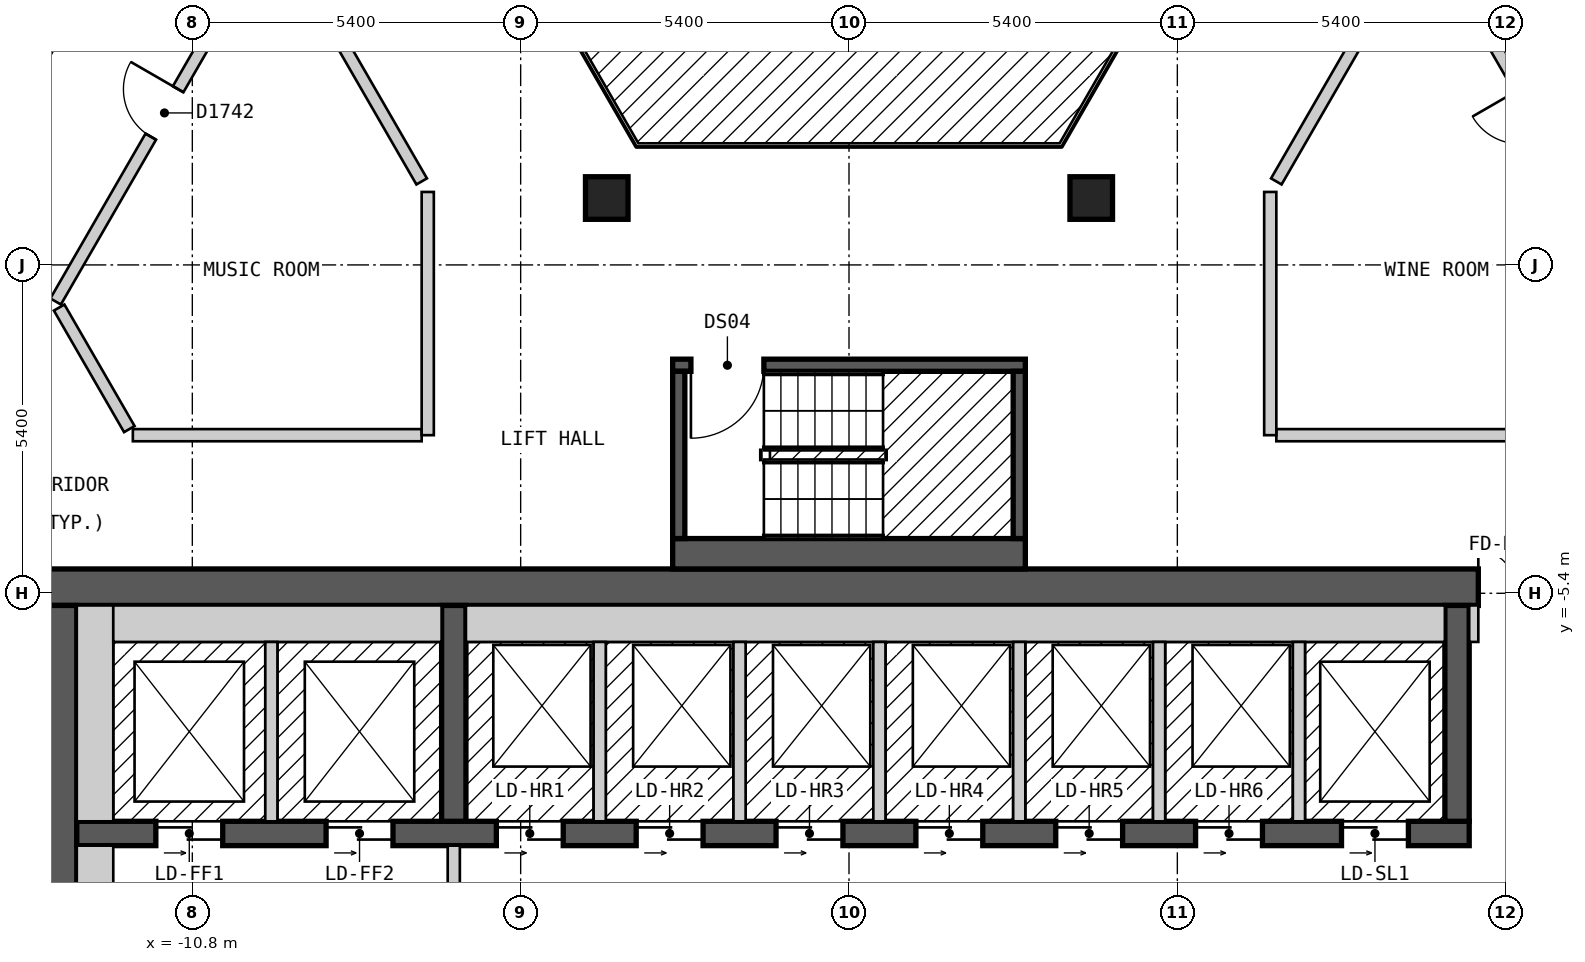
"""IFC4 building model, lengths in metres.
Left out: names, types, materials, properties, quantities, classifications, styles, units other than length and angle.
Written with IfcOpenShell. Run it as: python <this file> out.ifc"""

import sys

from ifc_helpers import new_model, si_unit, direction, frame, frame_2d, origin, origin_2d, place, context, subcontext, project, spatial, rectangle, extrude, element, fill, save


model = new_model("IFC4")
c1 = context("Model", 3, precision=1e-05, world=origin(), true_north=direction((0.0, 1.0)))
c2 = subcontext(c1, "Body", "Model", "MODEL_VIEW")
j1 = project(units=[si_unit("LENGTHUNIT", "METRE"), si_unit("PLANEANGLEUNIT", "RADIAN")], contexts=[c1])
p1 = place(None, origin())
s1 = spatial("IfcSite", under=j1, at=p1, CompositionType="ELEMENT")
p2 = place(p1, origin())
s2 = spatial("IfcBuilding", under=s1, at=p2, CompositionType="ELEMENT")
p3 = place(p2, frame((0.0, 0.0, 181.2)))
s3 = spatial("IfcBuildingStorey", under=s2, at=p3, CompositionType="ELEMENT", Elevation=181.2)
for number, where, z_axis, x_axis in (
    (1, (3.984, 1.1, 0.0), (0.0, 0.0, 1.0), (1.0, 0.0, 0.0)),
    (2, (-3.984, 1.1, 0.0), (0.0, 0.0, 1.0), (1.0, 0.0, 0.0)),
):
    element("IfcColumn", number, at=place(p3, frame(where, z_axis=z_axis, x_axis=x_axis)), inside=s3, PredefinedType="COLUMN", context=c2, shape_type="SweptSolid", body=[
        extrude(rectangle(XDim=0.7, YDim=0.7, at=origin_2d()), origin(), (0.0, 0.0, 1.0), 3.0),
    ])
p4 = place(p3, frame((-13.3, -5.3, 0.0), z_axis=(0.0, 0.0, 1.0), x_axis=(1.0, 0.0, 0.0)))
e3 = element("IfcWall", 3, at=p4, inside=s3, PredefinedType="SHEAR", context=c2, shape_type="SweptSolid", body=[
    extrude(rectangle(XDim=26.6, YDim=0.6, at=frame_2d((13.3, 0.0))), origin(), (0.0, 0.0, 1.0), 2.7),
])
p5 = place(p4, frame((23.65, 0.0, 0.0)))
e4 = element("IfcOpeningElement", 4, at=p5, cuts=e3, PredefinedType="OPENING", context=c2, shape_type="SweptSolid", body=[
    extrude(rectangle(XDim=1.2, YDim=2.1, at=frame_2d((0.6, 1.05))), frame((0.0, 0.31, 0.0), z_axis=(0.0, -1.0, 0.0), x_axis=(1.0, 0.0, 0.0)), (0.0, 0.0, 1.0), 0.62),
])
p6 = place(p3, frame((-13.0, -18.4, 0.0), z_axis=(0.0, 0.0, 1.0), x_axis=(0.0, 1.0, 0.0)))
e5 = element("IfcWall", 5, at=p6, inside=s3, PredefinedType="SHEAR", context=c2, shape_type="SweptSolid", body=[
    extrude(rectangle(XDim=12.8, YDim=0.6, at=frame_2d((6.4, 0.0))), origin(), (0.0, 0.0, 1.0), 2.7),
])
p7 = place(p6, frame((4.2, 0.0, 0.0)))
e6 = element("IfcOpeningElement", 6, at=p7, cuts=e5, PredefinedType="OPENING", context=c2, shape_type="SweptSolid", body=[
    extrude(rectangle(XDim=1.2, YDim=2.1, at=frame_2d((0.6, 1.05))), frame((0.0, 0.31, 0.0), z_axis=(0.0, -1.0, 0.0), x_axis=(1.0, 0.0, 0.0)), (0.0, 0.0, 1.0), 0.62),
])
p8 = place(p3, frame((-12.7, -9.35, 0.0), z_axis=(0.0, 0.0, 1.0), x_axis=(1.0, 0.0, 0.0)))
e7 = element("IfcWall", 7, at=p8, inside=s3, PredefinedType="SHEAR", context=c2, shape_type="SweptSolid", body=[
    extrude(rectangle(XDim=22.9, YDim=0.4, at=frame_2d((11.45, 0.0))), origin(), (0.0, 0.0, 1.0), 2.7),
])
p9 = place(p8, frame((1.3, 0.0, 0.0)))
e8 = element("IfcOpeningElement", 8, at=p9, cuts=e7, PredefinedType="OPENING", context=c2, shape_type="SweptSolid", body=[
    extrude(rectangle(XDim=1.1, YDim=2.1, at=frame_2d((0.55, 1.05))), frame((0.0, 0.21, 0.0), z_axis=(0.0, -1.0, 0.0), x_axis=(1.0, 0.0, 0.0)), (0.0, 0.0, 1.0), 0.42),
])
p10 = place(p8, frame((4.1, 0.0, 0.0)))
e9 = element("IfcOpeningElement", 9, at=p10, cuts=e7, PredefinedType="OPENING", context=c2, shape_type="SweptSolid", body=[
    extrude(rectangle(XDim=1.1, YDim=2.1, at=frame_2d((0.55, 1.05))), frame((0.0, 0.21, 0.0), z_axis=(0.0, -1.0, 0.0), x_axis=(1.0, 0.0, 0.0)), (0.0, 0.0, 1.0), 0.42),
])
p11 = place(p8, frame((6.9, 0.0, 0.0)))
e10 = element("IfcOpeningElement", 10, at=p11, cuts=e7, PredefinedType="OPENING", context=c2, shape_type="SweptSolid", body=[
    extrude(rectangle(XDim=1.1, YDim=2.1, at=frame_2d((0.55, 1.05))), frame((0.0, 0.21, 0.0), z_axis=(0.0, -1.0, 0.0), x_axis=(1.0, 0.0, 0.0)), (0.0, 0.0, 1.0), 0.42),
])
p12 = place(p8, frame((9.2, 0.0, 0.0)))
e11 = element("IfcOpeningElement", 11, at=p12, cuts=e7, PredefinedType="OPENING", context=c2, shape_type="SweptSolid", body=[
    extrude(rectangle(XDim=1.1, YDim=2.1, at=frame_2d((0.55, 1.05))), frame((0.0, 0.21, 0.0), z_axis=(0.0, -1.0, 0.0), x_axis=(1.0, 0.0, 0.0)), (0.0, 0.0, 1.0), 0.42),
])
p13 = place(p8, frame((11.5, 0.0, 0.0)))
e12 = element("IfcOpeningElement", 12, at=p13, cuts=e7, PredefinedType="OPENING", context=c2, shape_type="SweptSolid", body=[
    extrude(rectangle(XDim=1.1, YDim=2.1, at=frame_2d((0.55, 1.05))), frame((0.0, 0.21, 0.0), z_axis=(0.0, -1.0, 0.0), x_axis=(1.0, 0.0, 0.0)), (0.0, 0.0, 1.0), 0.42),
])
p14 = place(p8, frame((13.8, 0.0, 0.0)))
e13 = element("IfcOpeningElement", 13, at=p14, cuts=e7, PredefinedType="OPENING", context=c2, shape_type="SweptSolid", body=[
    extrude(rectangle(XDim=1.1, YDim=2.1, at=frame_2d((0.55, 1.05))), frame((0.0, 0.21, 0.0), z_axis=(0.0, -1.0, 0.0), x_axis=(1.0, 0.0, 0.0)), (0.0, 0.0, 1.0), 0.42),
])
p15 = place(p8, frame((16.1, 0.0, 0.0)))
e14 = element("IfcOpeningElement", 14, at=p15, cuts=e7, PredefinedType="OPENING", context=c2, shape_type="SweptSolid", body=[
    extrude(rectangle(XDim=1.1, YDim=2.1, at=frame_2d((0.55, 1.05))), frame((0.0, 0.21, 0.0), z_axis=(0.0, -1.0, 0.0), x_axis=(1.0, 0.0, 0.0)), (0.0, 0.0, 1.0), 0.42),
])
p16 = place(p8, frame((18.4, 0.0, 0.0)))
e15 = element("IfcOpeningElement", 15, at=p16, cuts=e7, PredefinedType="OPENING", context=c2, shape_type="SweptSolid", body=[
    extrude(rectangle(XDim=1.1, YDim=2.1, at=frame_2d((0.55, 1.05))), frame((0.0, 0.21, 0.0), z_axis=(0.0, -1.0, 0.0), x_axis=(1.0, 0.0, 0.0)), (0.0, 0.0, 1.0), 0.42),
])
p17 = place(p8, frame((20.8, 0.0, 0.0)))
e16 = element("IfcOpeningElement", 16, at=p17, cuts=e7, PredefinedType="OPENING", context=c2, shape_type="SweptSolid", body=[
    extrude(rectangle(XDim=1.1, YDim=2.1, at=frame_2d((0.55, 1.05))), frame((0.0, 0.21, 0.0), z_axis=(0.0, -1.0, 0.0), x_axis=(1.0, 0.0, 0.0)), (0.0, 0.0, 1.0), 0.42),
])
for number, where, z_axis, x_axis in (
    (17, (-6.5, -9.15, 0.0), (0.0, 0.0, 1.0), (0.0, 1.0, 0.0)),
    (18, (10.0, -9.15, 0.0), (0.0, 0.0, 1.0), (0.0, 1.0, 0.0)),
):
    element("IfcWall", number, at=place(p3, frame(where, z_axis=z_axis, x_axis=x_axis)), inside=s3, PredefinedType="SHEAR", context=c2, shape_type="SweptSolid", body=[
        extrude(rectangle(XDim=3.55, YDim=0.4, at=frame_2d((1.775, 0.0))), origin(), (0.0, 0.0, 1.0), 2.7),
    ])
p18 = place(p3, frame((-2.9, -4.75, 0.0), z_axis=(0.0, 0.0, 1.0), x_axis=(1.0, 0.0, 0.0)))
e19 = element("IfcWall", 19, at=p18, inside=s3, PredefinedType="SOLIDWALL", context=c2, shape_type="SweptSolid", body=[
    extrude(rectangle(XDim=5.8, YDim=0.5, at=frame_2d((2.9, 0.0))), origin(), (0.0, 0.0, 1.0), 2.7),
])
p19 = place(p3, frame((-2.9, -1.65, 0.0), z_axis=(0.0, 0.0, 1.0), x_axis=(1.0, 0.0, 0.0)))
e20 = element("IfcWall", 20, at=p19, inside=s3, PredefinedType="SOLIDWALL", context=c2, shape_type="SweptSolid", body=[
    extrude(rectangle(XDim=5.8, YDim=0.2, at=frame_2d((2.9, 0.0))), origin(), (0.0, 0.0, 1.0), 2.7),
])
p20 = place(p19, frame((0.3, 0.0, 0.0)))
e21 = element("IfcOpeningElement", 21, at=p20, cuts=e20, PredefinedType="OPENING", context=c2, shape_type="SweptSolid", body=[
    extrude(rectangle(XDim=1.2, YDim=2.1, at=frame_2d((0.6, 1.05))), frame((0.0, 0.11, 0.0), z_axis=(0.0, -1.0, 0.0), x_axis=(1.0, 0.0, 0.0)), (0.0, 0.0, 1.0), 0.22),
])
for number, where, z_axis, x_axis in (
    (22, (-2.8, -4.5, 0.0), (0.0, 0.0, 1.0), (0.0, 1.0, 0.0)),
    (23, (2.8, -4.5, 0.0), (0.0, 0.0, 1.0), (0.0, 1.0, 0.0)),
):
    element("IfcWall", number, at=place(p3, frame(where, z_axis=z_axis, x_axis=x_axis)), inside=s3, PredefinedType="SOLIDWALL", context=c2, shape_type="SweptSolid", body=[
        extrude(rectangle(XDim=2.75, YDim=0.2, at=frame_2d((1.375, 0.0))), origin(), (0.0, 0.0, 1.0), 2.7),
    ])
p21 = place(p3, frame((-9.411, 5.5, 0.0), z_axis=(0.0, 0.0, 1.0), x_axis=(0.500018099276, -0.86601495391, 0.0)))
e24 = element("IfcWall", 24, at=p21, inside=s3, PredefinedType="PARTITIONING", context=c2, shape_type="SweptSolid", body=[
    extrude(rectangle(XDim=4.765, YDim=0.2, at=frame_2d((2.383, 0.0))), origin(), (0.0, 0.0, 1.0), 2.7),
])
p22 = place(p3, frame((-12.99, -0.701, 0.0), z_axis=(0.0, 0.0, 1.0), x_axis=(0.499972710878, -0.866041158593, 0.0)))
e25 = element("IfcWall", 25, at=p22, inside=s3, PredefinedType="PARTITIONING", context=c2, shape_type="SweptSolid", body=[
    extrude(rectangle(XDim=2.308, YDim=0.2, at=frame_2d((1.154, 0.0))), origin(), (0.0, 0.0, 1.0), 2.7),
])
p23 = place(p3, frame((9.526, 5.5, 0.0), z_axis=(0.0, 0.0, 1.0), x_axis=(0.500062092869, -0.865989551482, 0.0)))
e26 = element("IfcWall", 26, at=p23, inside=s3, PredefinedType="PARTITIONING", context=c2, shape_type="SweptSolid", body=[
    extrude(rectangle(XDim=6.927, YDim=0.2, at=frame_2d((3.464, 0.0))), origin(), (0.0, 0.0, 1.0), 2.7),
])
p24 = place(p23, frame((3.014, 0.0, 0.0)))
e27 = element("IfcOpeningElement", 27, at=p24, cuts=e26, PredefinedType="OPENING", context=c2, shape_type="SweptSolid", body=[
    extrude(rectangle(XDim=0.9, YDim=2.1, at=frame_2d((0.45, 1.05))), frame((0.0, 0.11, 0.0), z_axis=(0.0, -1.0, 0.0), x_axis=(1.0, 0.0, 0.0)), (0.0, 0.0, 1.0), 0.22),
])
p25 = place(p3, frame((10.739, 7.8, 0.0), z_axis=(0.0, 0.0, 1.0), x_axis=(0.500023726918, -0.866011704609, 0.0)))
e28 = element("IfcWall", 28, at=p25, inside=s3, PredefinedType="PARTITIONING", context=c2, shape_type="SweptSolid", body=[
    extrude(rectangle(XDim=9.47, YDim=0.2, at=frame_2d((4.735, 0.0))), origin(), (0.0, 0.0, 1.0), 2.7),
])
p26 = place(p25, frame((8.168, 0.0, 0.0)))
e29 = element("IfcOpeningElement", 29, at=p26, cuts=e28, PredefinedType="OPENING", context=c2, shape_type="SweptSolid", body=[
    extrude(rectangle(XDim=1.0, YDim=2.1, at=frame_2d((0.5, 1.05))), frame((0.0, 0.11, 0.0), z_axis=(0.0, -1.0, 0.0), x_axis=(1.0, 0.0, 0.0)), (0.0, 0.0, 1.0), 0.22),
])
p27 = place(p3, frame((-11.778, -2.8, 0.0), z_axis=(0.0, 0.0, 1.0), x_axis=(1.0, 0.0, 0.0)))
e30 = element("IfcWall", 30, at=p27, inside=s3, PredefinedType="PARTITIONING", context=c2, shape_type="SweptSolid", body=[
    extrude(rectangle(XDim=4.75, YDim=0.2, at=frame_2d((2.375, 0.0))), origin(), (0.0, 0.0, 1.0), 2.7),
])
p28 = place(p3, frame((7.028, -2.8, 0.0), z_axis=(0.0, 0.0, 1.0), x_axis=(1.0, 0.0, 0.0)))
e31 = element("IfcWall", 31, at=p28, inside=s3, PredefinedType="PARTITIONING", context=c2, shape_type="SweptSolid", body=[
    extrude(rectangle(XDim=4.634, YDim=0.2, at=frame_2d((2.317, 0.0))), origin(), (0.0, 0.0, 1.0), 2.7),
])
p29 = place(p3, frame((7.028, 1.373, 0.0), z_axis=(0.0, 0.0, 1.0), x_axis=(0.500065924398, 0.86598733897, 0.0)))
e32 = element("IfcWall", 32, at=p29, inside=s3, PredefinedType="PARTITIONING", context=c2, shape_type="SweptSolid", body=[
    extrude(rectangle(XDim=4.881, YDim=0.2, at=frame_2d((2.44, 0.0))), origin(), (0.0, 0.0, 1.0), 2.7),
])
p30 = place(p3, frame((-13.048, -0.601, 0.0), z_axis=(0.0, 0.0, 1.0), x_axis=(0.499982180423, 0.866035691677, 0.0)))
e33 = element("IfcWall", 33, at=p30, inside=s3, PredefinedType="PARTITIONING", context=c2, shape_type="SweptSolid", body=[
    extrude(rectangle(XDim=7.16, YDim=0.2, at=frame_2d((3.58, 0.0))), origin(), (0.0, 0.0, 1.0), 2.7),
])
p31 = place(p30, frame((3.13, 0.0, 0.0)))
e34 = element("IfcOpeningElement", 34, at=p31, cuts=e33, PredefinedType="OPENING", context=c2, shape_type="SweptSolid", body=[
    extrude(rectangle(XDim=0.9, YDim=2.1, at=frame_2d((0.45, 1.05))), frame((0.0, 0.11, 0.0), z_axis=(0.0, -1.0, 0.0), x_axis=(1.0, 0.0, 0.0)), (0.0, 0.0, 1.0), 0.22),
])
p32 = place(p3, frame((-15.53, -0.501, 0.0), z_axis=(0.0, 0.0, 1.0), x_axis=(0.499952498232, 0.866052827206, 0.0)))
e35 = element("IfcWall", 35, at=p32, inside=s3, PredefinedType="PARTITIONING", context=c2, shape_type="SweptSolid", body=[
    extrude(rectangle(XDim=9.585, YDim=0.2, at=frame_2d((4.792, 0.0))), origin(), (0.0, 0.0, 1.0), 2.7),
])
p33 = place(p32, frame((0.525, 0.0, 0.0)))
e36 = element("IfcOpeningElement", 36, at=p33, cuts=e35, PredefinedType="OPENING", context=c2, shape_type="SweptSolid", body=[
    extrude(rectangle(XDim=1.0, YDim=2.1, at=frame_2d((0.5, 1.05))), frame((0.0, 0.11, 0.0), z_axis=(0.0, -1.0, 0.0), x_axis=(1.0, 0.0, 0.0)), (0.0, 0.0, 1.0), 0.22),
])
for number, where, z_axis, x_axis in (
    (37, (6.928, -2.8, 0.0), (0.0, 0.0, 1.0), (0.0, 1.0, 0.0)),
    (38, (-6.928, -2.8, 0.0), (0.0, 0.0, 1.0), (0.0, 1.0, 0.0)),
):
    element("IfcWall", number, at=place(p3, frame(where, z_axis=z_axis, x_axis=x_axis)), inside=s3, PredefinedType="PARTITIONING", context=c2, shape_type="SweptSolid", body=[
        extrude(rectangle(XDim=4.0, YDim=0.2, at=frame_2d((2.0, 0.0))), origin(), (0.0, 0.0, 1.0), 2.7),
    ])
p34 = place(p3, frame((-12.4, -13.0, 0.0), z_axis=(0.0, 0.0, 1.0), x_axis=(0.0, 1.0, 0.0)))
e39 = element("IfcWall", 39, at=p34, inside=s3, PredefinedType="PARTITIONING", context=c2, shape_type="SweptSolid", body=[
    extrude(rectangle(XDim=3.45, YDim=0.6, at=frame_2d((1.725, 0.0))), origin(), (0.0, 0.0, 1.0), 2.7),
])
p35 = place(p3, frame((-12.4, -9.15, 0.0), z_axis=(0.0, 0.0, 1.0), x_axis=(0.0, 1.0, 0.0)))
e40 = element("IfcWall", 40, at=p35, inside=s3, PredefinedType="SOLIDWALL", context=c2, shape_type="SweptSolid", body=[
    extrude(rectangle(XDim=3.55, YDim=0.6, at=frame_2d((1.775, 0.0))), origin(), (0.0, 0.0, 1.0), 2.7),
])
p36 = place(p3, frame((-12.1, -5.9, 0.0), z_axis=(0.0, 0.0, 1.0), x_axis=(1.0, 0.0, 0.0)))
e41 = element("IfcWall", 41, at=p36, inside=s3, PredefinedType="SOLIDWALL", context=c2, shape_type="SweptSolid", body=[
    extrude(rectangle(XDim=5.4, YDim=0.6, at=frame_2d((2.7, 0.0))), origin(), (0.0, 0.0, 1.0), 2.7),
])
p37 = place(p3, frame((-9.5, -9.15, 0.0), z_axis=(0.0, 0.0, 1.0), x_axis=(0.0, 1.0, 0.0)))
e42 = element("IfcWall", 42, at=p37, inside=s3, PredefinedType="SOLIDWALL", context=c2, shape_type="SweptSolid", body=[
    extrude(rectangle(XDim=2.95, YDim=0.2, at=frame_2d((1.475, 0.0))), origin(), (0.0, 0.0, 1.0), 2.7),
])
p38 = place(p3, frame((-6.5, -14.45, 0.0), z_axis=(0.0, 0.0, 1.0), x_axis=(0.0, 1.0, 0.0)))
e43 = element("IfcWall", 43, at=p38, inside=s3, PredefinedType="PARTITIONING", context=c2, shape_type="SweptSolid", body=[
    extrude(rectangle(XDim=4.9, YDim=0.2, at=frame_2d((2.45, 0.0))), origin(), (0.0, 0.0, 1.0), 2.7),
])
p39 = place(p38, frame((3.15, 0.0, 0.0), z_axis=(0.0, 0.0, 1.0), x_axis=(-1.0, 0.0, 0.0)))
e44 = element("IfcOpeningElement", 44, at=p39, cuts=e43, PredefinedType="OPENING", context=c2, shape_type="SweptSolid", body=[
    extrude(rectangle(XDim=1.4, YDim=2.1, at=frame_2d((0.7, 1.05))), frame((0.0, 0.11, 0.0), z_axis=(0.0, -1.0, 0.0), x_axis=(1.0, 0.0, 0.0)), (0.0, 0.0, 1.0), 0.22),
])
p40 = place(p3, frame((-6.3, -5.9, 0.0), z_axis=(0.0, 0.0, 1.0), x_axis=(1.0, 0.0, 0.0)))
e45 = element("IfcWall", 45, at=p40, inside=s3, PredefinedType="SOLIDWALL", context=c2, shape_type="SweptSolid", body=[
    extrude(rectangle(XDim=16.1, YDim=0.6, at=frame_2d((8.05, 0.0))), origin(), (0.0, 0.0, 1.0), 2.7),
])
for number, where, z_axis, x_axis in (
    (46, (-4.1, -9.15, 0.0), (0.0, 0.0, 1.0), (0.0, 1.0, 0.0)),
    (47, (-1.8, -9.15, 0.0), (0.0, 0.0, 1.0), (0.0, 1.0, 0.0)),
    (48, (0.5, -9.15, 0.0), (0.0, 0.0, 1.0), (0.0, 1.0, 0.0)),
    (49, (2.8, -9.15, 0.0), (0.0, 0.0, 1.0), (0.0, 1.0, 0.0)),
    (50, (5.1, -9.15, 0.0), (0.0, 0.0, 1.0), (0.0, 1.0, 0.0)),
    (51, (7.4, -9.15, 0.0), (0.0, 0.0, 1.0), (0.0, 1.0, 0.0)),
):
    element("IfcWall", number, at=place(p3, frame(where, z_axis=z_axis, x_axis=x_axis)), inside=s3, PredefinedType="SOLIDWALL", context=c2, shape_type="SweptSolid", body=[
        extrude(rectangle(XDim=2.95, YDim=0.2, at=frame_2d((1.475, 0.0))), origin(), (0.0, 0.0, 1.0), 2.7),
    ])
p41 = place(p3, frame((10.275, -6.2, 0.0), z_axis=(0.0, 0.0, 1.0), x_axis=(0.0, 1.0, 0.0)))
e52 = element("IfcWall", 52, at=p41, inside=s3, PredefinedType="PARTITIONING", context=c2, shape_type="SweptSolid", body=[
    extrude(rectangle(XDim=0.6, YDim=0.15, at=frame_2d((0.3, 0.0))), origin(), (0.0, 0.0, 1.0), 2.7),
])
p42 = place(p20, origin())
e53 = element("IfcDoor", 53, at=p42, inside=s3, OperationType="SINGLE_SWING_LEFT", PredefinedType="DOOR", context=c2, shape_type="SweptSolid", body=[
    extrude(rectangle(XDim=1.2, YDim=2.1, at=frame_2d((0.6, 1.05))), frame((0.0, 0.025, 0.0), z_axis=(0.0, -1.0, 0.0), x_axis=(1.0, 0.0, 0.0)), (0.0, 0.0, 1.0), 0.05),
])
fill(e21, e53)
p43 = place(p31, origin())
e54 = element("IfcDoor", 54, at=p43, inside=s3, OperationType="SINGLE_SWING_RIGHT", PredefinedType="DOOR", context=c2, shape_type="SweptSolid", body=[
    extrude(rectangle(XDim=0.9, YDim=2.1, at=frame_2d((0.45, 1.05))), frame((0.0, 0.025, 0.0), z_axis=(0.0, -1.0, 0.0), x_axis=(1.0, 0.0, 0.0)), (0.0, 0.0, 1.0), 0.05),
])
fill(e34, e54)
p44 = place(p9, origin())
e55 = element("IfcDoor", 55, at=p44, inside=s3, OperationType="DOUBLE_DOOR_SLIDING", PredefinedType="DOOR", context=c2, shape_type="SweptSolid", body=[
    extrude(rectangle(XDim=1.1, YDim=2.1, at=frame_2d((0.55, 1.05))), frame((0.0, 0.025, 0.0), z_axis=(0.0, -1.0, 0.0), x_axis=(1.0, 0.0, 0.0)), (0.0, 0.0, 1.0), 0.05),
])
fill(e8, e55)
p45 = place(p10, origin())
e56 = element("IfcDoor", 56, at=p45, inside=s3, OperationType="DOUBLE_DOOR_SLIDING", PredefinedType="DOOR", context=c2, shape_type="SweptSolid", body=[
    extrude(rectangle(XDim=1.1, YDim=2.1, at=frame_2d((0.55, 1.05))), frame((0.0, 0.025, 0.0), z_axis=(0.0, -1.0, 0.0), x_axis=(1.0, 0.0, 0.0)), (0.0, 0.0, 1.0), 0.05),
])
fill(e9, e56)
p46 = place(p11, origin())
e57 = element("IfcDoor", 57, at=p46, inside=s3, OperationType="DOUBLE_DOOR_SLIDING", PredefinedType="DOOR", context=c2, shape_type="SweptSolid", body=[
    extrude(rectangle(XDim=1.1, YDim=2.1, at=frame_2d((0.55, 1.05))), frame((0.0, 0.025, 0.0), z_axis=(0.0, -1.0, 0.0), x_axis=(1.0, 0.0, 0.0)), (0.0, 0.0, 1.0), 0.05),
])
fill(e10, e57)
p47 = place(p12, origin())
e58 = element("IfcDoor", 58, at=p47, inside=s3, OperationType="DOUBLE_DOOR_SLIDING", PredefinedType="DOOR", context=c2, shape_type="SweptSolid", body=[
    extrude(rectangle(XDim=1.1, YDim=2.1, at=frame_2d((0.55, 1.05))), frame((0.0, 0.025, 0.0), z_axis=(0.0, -1.0, 0.0), x_axis=(1.0, 0.0, 0.0)), (0.0, 0.0, 1.0), 0.05),
])
fill(e11, e58)
p48 = place(p13, origin())
e59 = element("IfcDoor", 59, at=p48, inside=s3, OperationType="DOUBLE_DOOR_SLIDING", PredefinedType="DOOR", context=c2, shape_type="SweptSolid", body=[
    extrude(rectangle(XDim=1.1, YDim=2.1, at=frame_2d((0.55, 1.05))), frame((0.0, 0.025, 0.0), z_axis=(0.0, -1.0, 0.0), x_axis=(1.0, 0.0, 0.0)), (0.0, 0.0, 1.0), 0.05),
])
fill(e12, e59)
p49 = place(p14, origin())
e60 = element("IfcDoor", 60, at=p49, inside=s3, OperationType="DOUBLE_DOOR_SLIDING", PredefinedType="DOOR", context=c2, shape_type="SweptSolid", body=[
    extrude(rectangle(XDim=1.1, YDim=2.1, at=frame_2d((0.55, 1.05))), frame((0.0, 0.025, 0.0), z_axis=(0.0, -1.0, 0.0), x_axis=(1.0, 0.0, 0.0)), (0.0, 0.0, 1.0), 0.05),
])
fill(e13, e60)
p50 = place(p15, origin())
e61 = element("IfcDoor", 61, at=p50, inside=s3, OperationType="DOUBLE_DOOR_SLIDING", PredefinedType="DOOR", context=c2, shape_type="SweptSolid", body=[
    extrude(rectangle(XDim=1.1, YDim=2.1, at=frame_2d((0.55, 1.05))), frame((0.0, 0.025, 0.0), z_axis=(0.0, -1.0, 0.0), x_axis=(1.0, 0.0, 0.0)), (0.0, 0.0, 1.0), 0.05),
])
fill(e14, e61)
p51 = place(p16, origin())
e62 = element("IfcDoor", 62, at=p51, inside=s3, OperationType="DOUBLE_DOOR_SLIDING", PredefinedType="DOOR", context=c2, shape_type="SweptSolid", body=[
    extrude(rectangle(XDim=1.1, YDim=2.1, at=frame_2d((0.55, 1.05))), frame((0.0, 0.025, 0.0), z_axis=(0.0, -1.0, 0.0), x_axis=(1.0, 0.0, 0.0)), (0.0, 0.0, 1.0), 0.05),
])
fill(e15, e62)
p52 = place(p17, origin())
e63 = element("IfcDoor", 63, at=p52, inside=s3, OperationType="DOUBLE_DOOR_SLIDING", PredefinedType="DOOR", context=c2, shape_type="SweptSolid", body=[
    extrude(rectangle(XDim=1.1, YDim=2.1, at=frame_2d((0.55, 1.05))), frame((0.0, 0.025, 0.0), z_axis=(0.0, -1.0, 0.0), x_axis=(1.0, 0.0, 0.0)), (0.0, 0.0, 1.0), 0.05),
])
fill(e16, e63)
p53 = place(p5, origin())
e64 = element("IfcDoor", 64, at=p53, inside=s3, OperationType="DOUBLE_DOOR_SINGLE_SWING", PredefinedType="DOOR", context=c2, shape_type="SweptSolid", body=[
    extrude(rectangle(XDim=1.2, YDim=2.1, at=frame_2d((0.6, 1.05))), frame((0.0, 0.025, 0.0), z_axis=(0.0, -1.0, 0.0), x_axis=(1.0, 0.0, 0.0)), (0.0, 0.0, 1.0), 0.05),
])
fill(e4, e64)
save(model, sys.argv[1])
